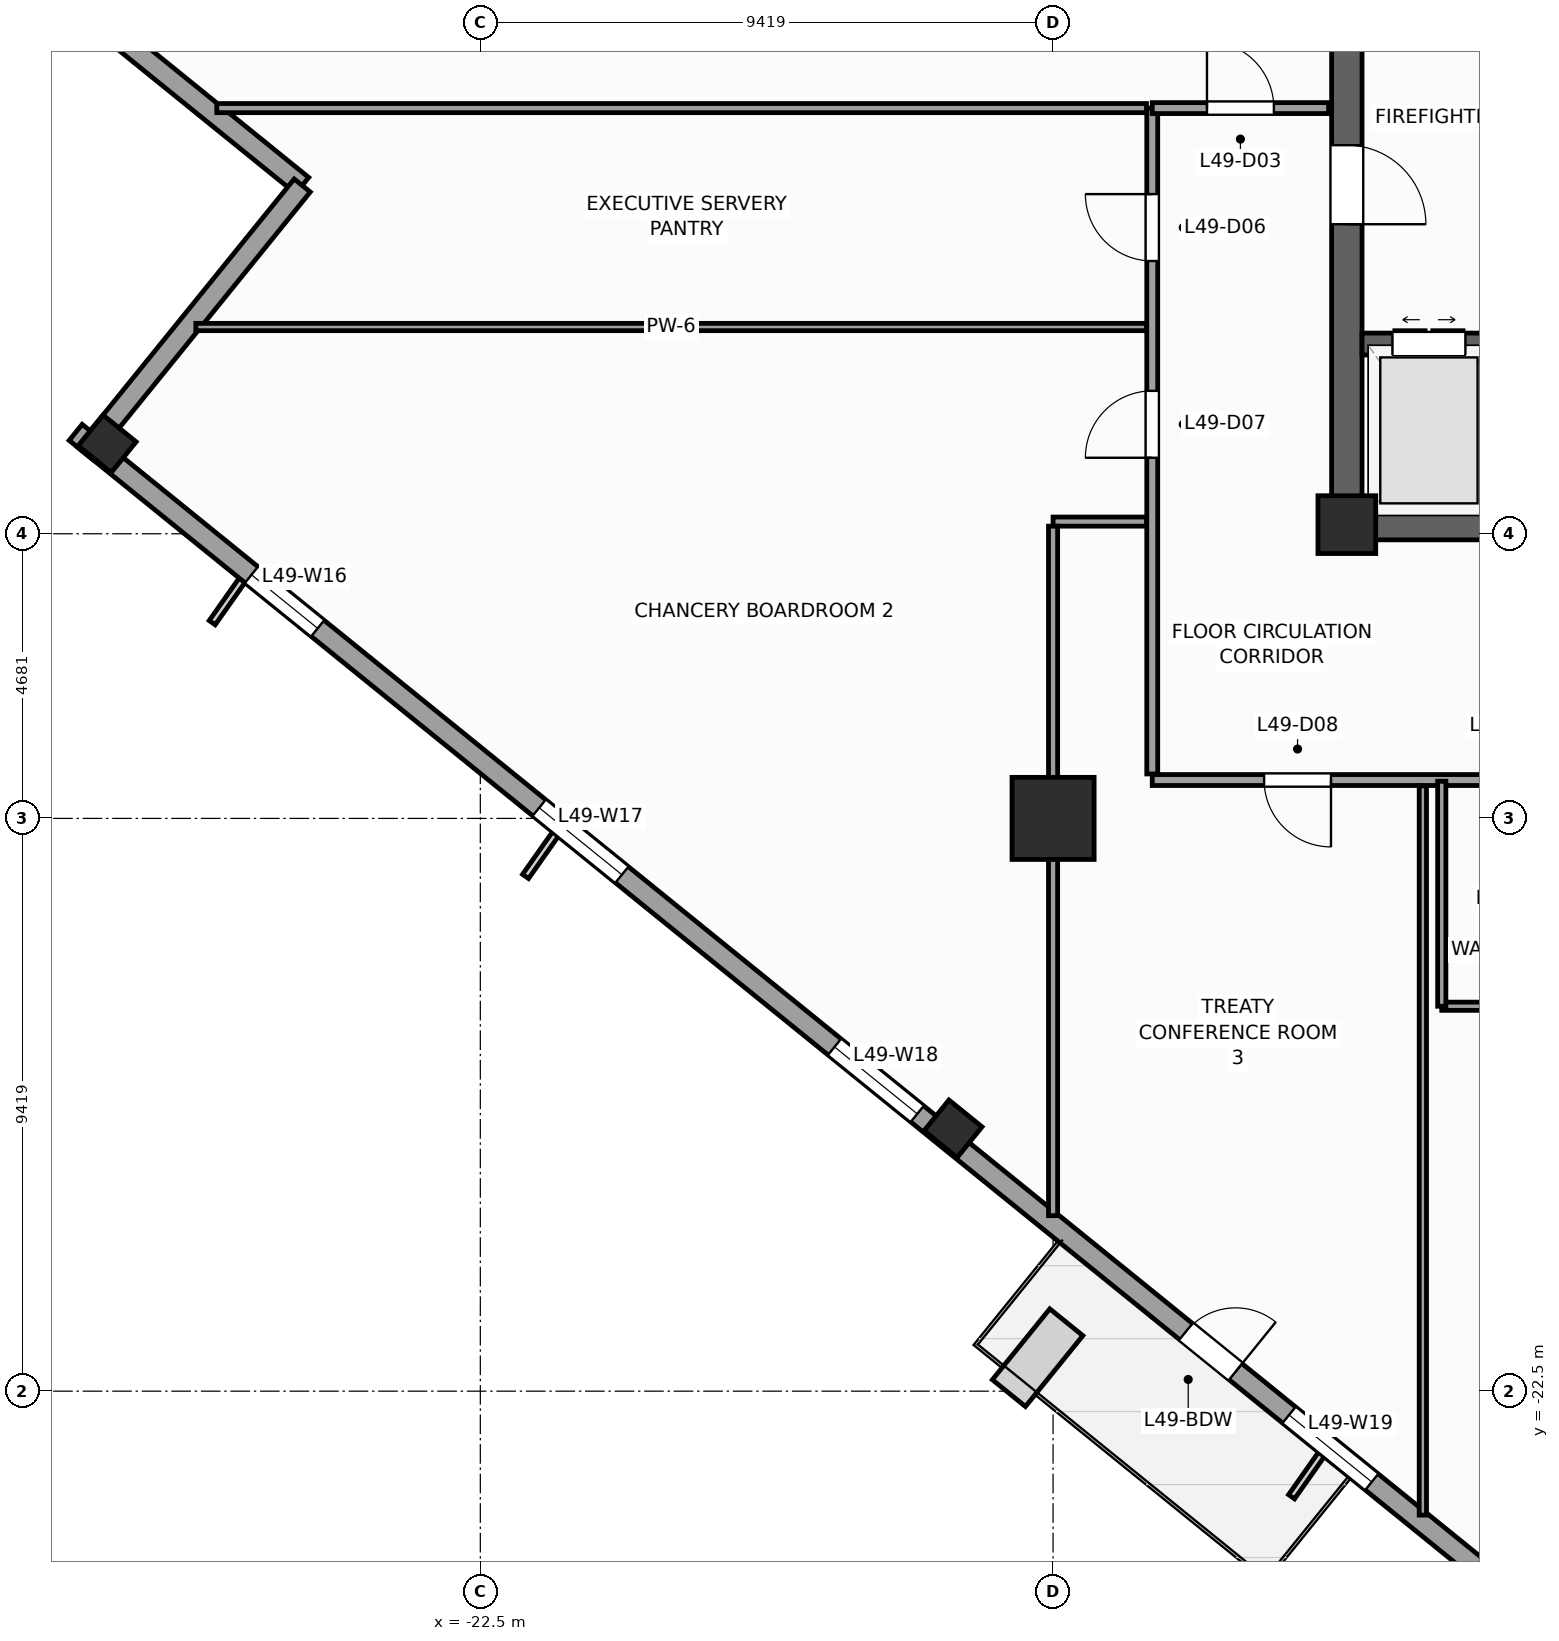
"""IFC4 building model, lengths in metres.
Left out: names, types, materials, properties, quantities, classifications, styles, units other than length and angle.
Written with IfcOpenShell. Run it as: python <this file> out.ifc"""

import sys

from ifc_helpers import new_model, si_unit, direction, frame, frame_2d, origin, origin_2d, place, context, subcontext, project, spatial, rectangle, extrude, source, transform, mapped, element, fill, save


model = new_model("IFC4")
c1 = context("Model", 3, precision=1e-05, world=origin(), true_north=direction((0.0, 1.0)))
c2 = subcontext(c1, "Body", "Model", "MODEL_VIEW")
j1 = project(units=[si_unit("LENGTHUNIT", "METRE"), si_unit("PLANEANGLEUNIT", "RADIAN")], contexts=[c1])
p1 = place(None, origin())
s1 = spatial("IfcSite", under=j1, at=p1, CompositionType="ELEMENT")
p2 = place(p1, origin())
s2 = spatial("IfcBuilding", under=s1, at=p2, CompositionType="ELEMENT")
p3 = place(p2, frame((0.0, 0.0, 205.6)))
s3 = spatial("IfcBuildingStorey", under=s2, at=p3, CompositionType="ELEMENT", Elevation=205.6)
p4 = place(p3, frame((-8.5, -8.25, 0.0), z_axis=(0.0, 0.0, 1.0), x_axis=(1.0, 0.0, 0.0)))
e1 = element("IfcWall", 1, at=p4, inside=s3, PredefinedType="SHEAR", context=c2, shape_type="SweptSolid", body=[
    extrude(rectangle(XDim=17.0, YDim=0.5, at=frame_2d((8.5, 0.0))), origin(), (0.0, 0.0, 1.0), 3.9),
])
p5 = place(p4, frame((7.85, 0.0, 0.0)))
e2 = element("IfcOpeningElement", 2, at=p5, cuts=e1, PredefinedType="OPENING", context=c2, shape_type="SweptSolid", body=[
    extrude(rectangle(XDim=1.3, YDim=2.2, at=frame_2d((0.65, 1.1))), frame((0.0, 0.26, 0.0), z_axis=(0.0, -1.0, 0.0), x_axis=(1.0, 0.0, 0.0)), (0.0, 0.0, 1.0), 0.52),
])
p6 = place(p3, frame((-8.25, -8.0, 0.0), z_axis=(0.0, 0.0, 1.0), x_axis=(0.0, 1.0, 0.0)))
e3 = element("IfcWall", 3, at=p6, inside=s3, PredefinedType="SHEAR", context=c2, shape_type="SweptSolid", body=[
    extrude(rectangle(XDim=16.0, YDim=0.5, at=frame_2d((8.0, 0.0))), origin(), (0.0, 0.0, 1.0), 3.9),
])
p7 = place(p6, frame((4.69, 0.0, 0.0)))
e4 = element("IfcOpeningElement", 4, at=p7, cuts=e3, PredefinedType="OPENING", context=c2, shape_type="SweptSolid", body=[
    extrude(rectangle(XDim=1.3, YDim=2.2, at=frame_2d((0.65, 1.1))), frame((0.0, 0.26, 0.0), z_axis=(0.0, -1.0, 0.0), x_axis=(1.0, 0.0, 0.0)), (0.0, 0.0, 1.0), 0.52),
])
p8 = place(p3, frame((-8.0, -5.28, 0.0), z_axis=(0.0, 0.0, 1.0), x_axis=(1.0, 0.0, 0.0)))
e5 = element("IfcWall", 5, at=p8, inside=s3, PredefinedType="SHEAR", context=c2, shape_type="SweptSolid", body=[
    extrude(rectangle(XDim=3.46, YDim=0.36, at=frame_2d((1.73, 0.0))), origin(), (0.0, 0.0, 1.0), 3.9),
])
p9 = place(p8, frame((0.5, 0.0, 0.0)))
e6 = element("IfcOpeningElement", 6, at=p9, cuts=e5, PredefinedType="OPENING", context=c2, shape_type="SweptSolid", body=[
    extrude(rectangle(XDim=1.2, YDim=2.25, at=frame_2d((0.6, 1.125))), frame((0.0, 0.19, 0.0), z_axis=(0.0, -1.0, 0.0), x_axis=(1.0, 0.0, 0.0)), (0.0, 0.0, 1.0), 0.38),
])
m1 = source(origin(), c2, "Body", "SweptSolid", [
    extrude(rectangle(XDim=0.95, YDim=0.95, at=origin_2d()), origin(), (0.0, 0.0, 1.0), 3.9),
])
p10 = place(p3, frame((-8.25, -8.25, 0.0), z_axis=(0.0, 0.0, 1.0), x_axis=(1.0, 0.0, 0.0)))
e7 = element("IfcColumn", 7, at=p10, inside=s3, PredefinedType="PILASTER", context=c2, shape_type="MappedRepresentation", body=[
    mapped(m1, transform((0.0, 0.0, 0.0), scale=1.0)),
])
m2 = source(origin(), c2, "Body", "SweptSolid", [
    extrude(rectangle(XDim=1.35, YDim=1.35, at=origin_2d()), origin(), (0.0, 0.0, 1.0), 3.9),
])
p11 = place(p3, frame((-13.081, -13.081, 0.0), z_axis=(0.0, 0.0, 1.0), x_axis=(1.0, 0.0, 0.0)))
e8 = element("IfcColumn", 8, at=p11, inside=s3, PredefinedType="COLUMN", context=c2, shape_type="MappedRepresentation", body=[
    mapped(m2, transform((0.0, 0.0, 0.0), scale=1.0)),
])
m3 = source(origin(), c2, "Body", "SweptSolid", [
    extrude(rectangle(XDim=0.65, YDim=0.7, at=origin_2d()), origin(), (0.0, 0.0, 1.0), 3.9),
])
for number, where, z_axis, x_axis in (
    (9, (-28.637, -6.92, 0.0), (0.0, 0.0, 1.0), (0.629, 0.777, 0.0)),
    (10, (-14.726, -18.185, 0.0), (0.0, 0.0, 1.0), (0.629, 0.777, 0.0)),
):
    element("IfcColumn", number, at=place(p3, frame(where, z_axis=z_axis, x_axis=x_axis)), inside=s3, PredefinedType="COLUMN", context=c2, shape_type="MappedRepresentation", body=[
        mapped(m3, transform((0.0, 0.0, 0.0), scale=1.0)),
    ])
p12 = place(p3, frame((-29.703, 0.789, 0.0), z_axis=(0.0, 0.0, 1.0), x_axis=(0.77714355312, -0.629323365087, 0.0)))
e11 = element("IfcWall", 11, at=p12, inside=s3, PredefinedType="STANDARD", context=c2, shape_type="SweptSolid", body=[
    extrude(rectangle(XDim=5.5, YDim=0.34, at=frame_2d((2.75, 0.0))), origin(), (0.0, 0.0, 1.0), 3.66),
])
p13 = place(p3, frame((-25.429, -2.673, 0.0), z_axis=(0.0, 0.0, 1.0), x_axis=(-0.629299794138, -0.777162640055, 0.0)))
e12 = element("IfcWall", 12, at=p13, inside=s3, PredefinedType="STANDARD", context=c2, shape_type="SweptSolid", body=[
    extrude(rectangle(XDim=5.67, YDim=0.34, at=frame_2d((2.835, 0.0))), origin(), (0.0, 0.0, 1.0), 3.66),
])
p14 = place(p3, frame((-29.154, -6.733, 0.0), z_axis=(0.0, 0.0, 1.0), x_axis=(0.77714192302, -0.629325378072, 0.0)))
e13 = element("IfcWall", 13, at=p14, inside=s3, PredefinedType="STANDARD", context=c2, shape_type="SweptSolid", body=[
    extrude(rectangle(XDim=36.84, YDim=0.34, at=frame_2d((18.42, 0.0))), origin(), (0.0, 0.0, 1.0), 2.96),
])
p15 = place(p14, frame((23.495, 0.0, 0.0)))
e14 = element("IfcOpeningElement", 14, at=p15, cuts=e13, PredefinedType="OPENING", context=c2, shape_type="SweptSolid", body=[
    extrude(rectangle(XDim=1.05, YDim=2.25, at=frame_2d((0.525, 1.125))), frame((0.0, 0.18, 0.0), z_axis=(0.0, -1.0, 0.0), x_axis=(1.0, 0.0, 0.0)), (0.0, 0.0, 1.0), 0.36),
])
p16 = place(p14, frame((3.721, 0.0, 0.48)))
e15 = element("IfcOpeningElement", 15, at=p16, cuts=e13, PredefinedType="OPENING", context=c2, shape_type="SweptSolid", body=[
    extrude(rectangle(XDim=1.4, YDim=2.4, at=frame_2d((0.7, 1.2))), frame((0.0, 0.18, 0.0), z_axis=(0.0, -1.0, 0.0), x_axis=(1.0, 0.0, 0.0)), (0.0, 0.0, 1.0), 0.36),
])
p17 = place(p14, frame((9.809, 0.0, 0.58)))
e16 = element("IfcOpeningElement", 16, at=p17, cuts=e13, PredefinedType="OPENING", context=c2, shape_type="SweptSolid", body=[
    extrude(rectangle(XDim=1.75, YDim=2.3, at=frame_2d((0.875, 1.15))), frame((0.0, 0.18, 0.0), z_axis=(0.0, -1.0, 0.0), x_axis=(1.0, 0.0, 0.0)), (0.0, 0.0, 1.0), 0.36),
])
p18 = place(p14, frame((16.058, 0.0, 0.58)))
e17 = element("IfcOpeningElement", 17, at=p18, cuts=e13, PredefinedType="OPENING", context=c2, shape_type="SweptSolid", body=[
    extrude(rectangle(XDim=1.75, YDim=2.3, at=frame_2d((0.875, 1.15))), frame((0.0, 0.18, 0.0), z_axis=(0.0, -1.0, 0.0), x_axis=(1.0, 0.0, 0.0)), (0.0, 0.0, 1.0), 0.36),
])
p19 = place(p14, frame((25.676, 0.0, 0.58)))
e18 = element("IfcOpeningElement", 18, at=p19, cuts=e13, PredefinedType="OPENING", context=c2, shape_type="SweptSolid", body=[
    extrude(rectangle(XDim=1.75, YDim=2.3, at=frame_2d((0.875, 1.15))), frame((0.0, 0.18, 0.0), z_axis=(0.0, -1.0, 0.0), x_axis=(1.0, 0.0, 0.0)), (0.0, 0.0, 1.0), 0.36),
])
p20 = place(p14, frame((30.982, 0.0, 0.48)))
e19 = element("IfcOpeningElement", 19, at=p20, cuts=e13, PredefinedType="OPENING", context=c2, shape_type="SweptSolid", body=[
    extrude(rectangle(XDim=1.4, YDim=2.4, at=frame_2d((0.7, 1.2))), frame((0.0, 0.18, 0.0), z_axis=(0.0, -1.0, 0.0), x_axis=(1.0, 0.0, 0.0)), (0.0, 0.0, 1.0), 0.36),
])
p21 = place(p3, frame((-11.45, -12.45, 0.0), z_axis=(0.0, 0.0, 1.0), x_axis=(1.0, 0.0, 0.0)))
e20 = element("IfcWall", 20, at=p21, inside=s3, PredefinedType="PARTITIONING", context=c2, shape_type="SweptSolid", body=[
    extrude(rectangle(XDim=21.75, YDim=0.18, at=frame_2d((10.875, 0.0))), origin(), (0.0, 0.0, 1.0), 3.66),
])
p22 = place(p21, frame((5.411, 0.0, 0.0)))
e21 = element("IfcOpeningElement", 21, at=p22, cuts=e20, PredefinedType="OPENING", context=c2, shape_type="SweptSolid", body=[
    extrude(rectangle(XDim=0.95, YDim=2.1, at=frame_2d((0.475, 1.05))), frame((0.0, 0.1, 0.0), z_axis=(0.0, -1.0, 0.0), x_axis=(1.0, 0.0, 0.0)), (0.0, 0.0, 1.0), 0.2),
])
p23 = place(p21, frame((1.839, 0.0, 0.0)))
e22 = element("IfcOpeningElement", 22, at=p23, cuts=e20, PredefinedType="OPENING", context=c2, shape_type="SweptSolid", body=[
    extrude(rectangle(XDim=1.1, YDim=2.2, at=frame_2d((0.55, 1.1))), frame((0.0, 0.1, 0.0), z_axis=(0.0, -1.0, 0.0), x_axis=(1.0, 0.0, 0.0)), (0.0, 0.0, 1.0), 0.2),
])
p24 = place(p21, frame((7.574, 0.0, 0.0)))
e23 = element("IfcOpeningElement", 23, at=p24, cuts=e20, PredefinedType="OPENING", context=c2, shape_type="SweptSolid", body=[
    extrude(rectangle(XDim=1.1, YDim=2.2, at=frame_2d((0.55, 1.1))), frame((0.0, 0.1, 0.0), z_axis=(0.0, -1.0, 0.0), x_axis=(1.0, 0.0, 0.0)), (0.0, 0.0, 1.0), 0.2),
])
p25 = place(p21, frame((11.05, 0.0, 0.0)))
e24 = element("IfcOpeningElement", 24, at=p25, cuts=e20, PredefinedType="OPENING", context=c2, shape_type="SweptSolid", body=[
    extrude(rectangle(XDim=1.1, YDim=2.2, at=frame_2d((0.55, 1.1))), frame((0.0, 0.1, 0.0), z_axis=(0.0, -1.0, 0.0), x_axis=(1.0, 0.0, 0.0)), (0.0, 0.0, 1.0), 0.2),
])
p26 = place(p21, frame((15.65, 0.0, 0.0)))
e25 = element("IfcOpeningElement", 25, at=p26, cuts=e20, PredefinedType="OPENING", context=c2, shape_type="SweptSolid", body=[
    extrude(rectangle(XDim=1.1, YDim=2.2, at=frame_2d((0.55, 1.1))), frame((0.0, 0.1, 0.0), z_axis=(0.0, -1.0, 0.0), x_axis=(1.0, 0.0, 0.0)), (0.0, 0.0, 1.0), 0.2),
])
p27 = place(p3, frame((-11.45, -12.35, 0.0), z_axis=(0.0, 0.0, 1.0), x_axis=(0.0, 1.0, 0.0)))
e26 = element("IfcWall", 26, at=p27, inside=s3, PredefinedType="PARTITIONING", context=c2, shape_type="SweptSolid", body=[
    extrude(rectangle(XDim=10.95, YDim=0.18, at=frame_2d((5.475, 0.0))), origin(), (0.0, 0.0, 1.0), 3.66),
])
p28 = place(p27, frame((8.436, 0.0, 0.0)))
e27 = element("IfcOpeningElement", 27, at=p28, cuts=e26, PredefinedType="OPENING", context=c2, shape_type="SweptSolid", body=[
    extrude(rectangle(XDim=1.1, YDim=2.2, at=frame_2d((0.55, 1.1))), frame((0.0, 0.1, 0.0), z_axis=(0.0, -1.0, 0.0), x_axis=(1.0, 0.0, 0.0)), (0.0, 0.0, 1.0), 0.2),
])
p29 = place(p27, frame((5.2, 0.0, 0.0)))
e28 = element("IfcOpeningElement", 28, at=p29, cuts=e26, PredefinedType="OPENING", context=c2, shape_type="SweptSolid", body=[
    extrude(rectangle(XDim=1.1, YDim=2.2, at=frame_2d((0.55, 1.1))), frame((0.0, 0.1, 0.0), z_axis=(0.0, -1.0, 0.0), x_axis=(1.0, 0.0, 0.0)), (0.0, 0.0, 1.0), 0.2),
])
p30 = place(p3, frame((-11.45, -1.4, 0.0), z_axis=(0.0, 0.0, 1.0), x_axis=(1.0, 0.0, 0.0)))
e29 = element("IfcWall", 29, at=p30, inside=s3, PredefinedType="PARTITIONING", context=c2, shape_type="SweptSolid", body=[
    extrude(rectangle(XDim=2.9, YDim=0.18, at=frame_2d((1.45, 0.0))), origin(), (0.0, 0.0, 1.0), 3.66),
])
p31 = place(p30, frame((0.9, 0.0, 0.0)))
e30 = element("IfcOpeningElement", 30, at=p31, cuts=e29, PredefinedType="OPENING", context=c2, shape_type="SweptSolid", body=[
    extrude(rectangle(XDim=1.1, YDim=2.2, at=frame_2d((0.55, 1.1))), frame((0.0, 0.1, 0.0), z_axis=(0.0, -1.0, 0.0), x_axis=(1.0, 0.0, 0.0)), (0.0, 0.0, 1.0), 0.2),
])
p32 = place(p3, frame((-26.834, -1.4, 0.0), z_axis=(0.0, 0.0, 1.0), x_axis=(1.0, 0.0, 0.0)))
e31 = element("IfcWall", 31, at=p32, inside=s3, PredefinedType="PARTITIONING", context=c2, shape_type="SweptSolid", body=[
    extrude(rectangle(XDim=15.289, YDim=0.15, at=frame_2d((7.645, 0.0))), origin(), (0.0, 0.0, 1.0), 3.66),
])
p33 = place(p3, frame((-11.545, -8.2, 0.0), z_axis=(0.0, 0.0, 1.0), x_axis=(-1.0, 0.0, 0.0)))
e32 = element("IfcWall", 32, at=p33, inside=s3, PredefinedType="PARTITIONING", context=c2, shape_type="SweptSolid", body=[
    extrude(rectangle(XDim=1.536, YDim=0.15, at=frame_2d((0.768, 0.0))), origin(), (0.0, 0.0, 1.0), 3.66),
])
p34 = place(p3, frame((-13.081, -8.275, 0.0), z_axis=(0.0, 0.0, 1.0), x_axis=(0.0, -1.0, 0.0)))
e33 = element("IfcWall", 33, at=p34, inside=s3, PredefinedType="PARTITIONING", context=c2, shape_type="SweptSolid", body=[
    extrude(rectangle(XDim=11.339, YDim=0.15, at=frame_2d((5.669, 0.0))), origin(), (0.0, 0.0, 1.0), 2.76),
])
p35 = place(p3, frame((-27.178, -5.0, 0.0), z_axis=(0.0, 0.0, 1.0), x_axis=(1.0, 0.0, 0.0)))
e34 = element("IfcWall", 34, at=p35, inside=s3, PredefinedType="PARTITIONING", context=c2, shape_type="SweptSolid", body=[
    extrude(rectangle(XDim=15.634, YDim=0.12, at=frame_2d((7.817, 0.0))), origin(), (0.0, 0.0, 1.0), 3.66),
])
p36 = place(p3, frame((-7.0, -24.538, 0.0), z_axis=(0.0, 0.0, 1.0), x_axis=(0.0, 1.0, 0.0)))
e35 = element("IfcWall", 35, at=p36, inside=s3, PredefinedType="PARTITIONING", context=c2, shape_type="SweptSolid", body=[
    extrude(rectangle(XDim=11.993, YDim=0.12, at=frame_2d((5.997, 0.0))), origin(), (0.0, 0.0, 1.0), 3.66),
])
p37 = place(p3, frame((-6.689, -16.17, 0.0), z_axis=(0.0, 0.0, 1.0), x_axis=(1.0, 0.0, 0.0)))
e36 = element("IfcWall", 36, at=p37, inside=s3, PredefinedType="PARTITIONING", context=c2, shape_type="SweptSolid", body=[
    extrude(rectangle(XDim=2.25, YDim=0.135, at=frame_2d((1.125, 0.0))), origin(), (0.0, 0.0, 1.0), 3.66),
])
p38 = place(p3, frame((-6.689, -16.17, 0.0), z_axis=(0.0, 0.0, 1.0), x_axis=(0.0, 1.0, 0.0)))
e37 = element("IfcWall", 37, at=p38, inside=s3, PredefinedType="PARTITIONING", context=c2, shape_type="SweptSolid", body=[
    extrude(rectangle(XDim=3.7, YDim=0.135, at=frame_2d((1.85, 0.0))), origin(), (0.0, 0.0, 1.0), 3.66),
])
m4 = source(origin(), c2, "Body", "SweptSolid", [
    extrude(rectangle(XDim=1.05, YDim=2.25, at=frame_2d((0.525, 1.125))), frame((0.0, 0.025, 0.0), z_axis=(0.0, -1.0, 0.0), x_axis=(1.0, 0.0, 0.0)), (0.0, 0.0, 1.0), 0.05),
])
p39 = place(p15, origin())
e38 = element("IfcDoor", 38, at=p39, inside=s3, OperationType="SINGLE_SWING_RIGHT", PredefinedType="DOOR", context=c2, shape_type="MappedRepresentation", body=[
    mapped(m4, transform((0.0, 0.0, 0.0), scale=1.0)),
])
fill(e14, e38)
m5 = source(origin(), c2, "Body", "SweptSolid", [
    extrude(rectangle(XDim=1.4, YDim=2.4, at=frame_2d((0.7, 1.2))), frame((0.0, 0.03, 0.0), z_axis=(0.0, -1.0, 0.0), x_axis=(1.0, 0.0, 0.0)), (0.0, 0.0, 1.0), 0.06),
])
p40 = place(p16, origin())
e39 = element("IfcWindow", 39, at=p40, inside=s3, PartitioningType="SINGLE_PANEL", PredefinedType="WINDOW", context=c2, shape_type="MappedRepresentation", body=[
    mapped(m5, transform((0.0, 0.0, 0.0), scale=1.0)),
])
fill(e15, e39)
m6 = source(origin(), c2, "Body", "SweptSolid", [
    extrude(rectangle(XDim=1.75, YDim=2.3, at=frame_2d((0.875, 1.15))), frame((0.0, 0.03, 0.0), z_axis=(0.0, -1.0, 0.0), x_axis=(1.0, 0.0, 0.0)), (0.0, 0.0, 1.0), 0.06),
])
p41 = place(p17, origin())
e40 = element("IfcWindow", 40, at=p41, inside=s3, PartitioningType="SINGLE_PANEL", PredefinedType="WINDOW", context=c2, shape_type="MappedRepresentation", body=[
    mapped(m6, transform((0.0, 0.0, 0.0), scale=1.0)),
])
fill(e16, e40)
p42 = place(p18, origin())
e41 = element("IfcWindow", 41, at=p42, inside=s3, PartitioningType="SINGLE_PANEL", PredefinedType="WINDOW", context=c2, shape_type="MappedRepresentation", body=[
    mapped(m6, transform((0.0, 0.0, 0.0), scale=1.0)),
])
fill(e17, e41)
p43 = place(p19, origin())
e42 = element("IfcWindow", 42, at=p43, inside=s3, PartitioningType="SINGLE_PANEL", PredefinedType="WINDOW", context=c2, shape_type="MappedRepresentation", body=[
    mapped(m6, transform((0.0, 0.0, 0.0), scale=1.0)),
])
fill(e18, e42)
m7 = source(origin(), c2, "Body", "SweptSolid", [
    extrude(rectangle(XDim=1.3, YDim=2.2, at=frame_2d((0.65, 1.1))), frame((0.0, 0.025, 0.0), z_axis=(0.0, -1.0, 0.0), x_axis=(1.0, 0.0, 0.0)), (0.0, 0.0, 1.0), 0.05),
])
p44 = place(p7, frame((1.3, 0.0, 0.0), z_axis=(0.0, 0.0, 1.0), x_axis=(-1.0, 0.0, 0.0)))
e43 = element("IfcDoor", 43, at=p44, inside=s3, OperationType="SINGLE_SWING_LEFT", PredefinedType="DOOR", context=c2, shape_type="MappedRepresentation", body=[
    mapped(m7, transform((0.0, 0.0, 0.0), scale=1.0)),
])
fill(e4, e43)
m8 = source(origin(), c2, "Body", "SweptSolid", [
    extrude(rectangle(XDim=1.2, YDim=2.25, at=frame_2d((0.6, 1.125))), frame((0.0, 0.025, 0.0), z_axis=(0.0, -1.0, 0.0), x_axis=(1.0, 0.0, 0.0)), (0.0, 0.0, 1.0), 0.05),
])
p45 = place(p9, origin())
e44 = element("IfcDoor", 44, at=p45, inside=s3, OperationType="DOUBLE_DOOR_SLIDING", PredefinedType="DOOR", context=c2, shape_type="MappedRepresentation", body=[
    mapped(m8, transform((0.0, 0.0, 0.0), scale=1.0)),
])
fill(e6, e44)
m9 = source(origin(), c2, "Body", "SweptSolid", [
    extrude(rectangle(XDim=1.1, YDim=2.2, at=frame_2d((0.55, 1.1))), frame((0.0, 0.025, 0.0), z_axis=(0.0, -1.0, 0.0), x_axis=(1.0, 0.0, 0.0)), (0.0, 0.0, 1.0), 0.05),
])
p46 = place(p31, origin())
e45 = element("IfcDoor", 45, at=p46, inside=s3, OperationType="SINGLE_SWING_LEFT", PredefinedType="DOOR", context=c2, shape_type="MappedRepresentation", body=[
    mapped(m9, transform((0.0, 0.0, 0.0), scale=1.0)),
])
fill(e30, e45)
p47 = place(p28, origin())
e46 = element("IfcDoor", 46, at=p47, inside=s3, OperationType="SINGLE_SWING_RIGHT", PredefinedType="DOOR", context=c2, shape_type="MappedRepresentation", body=[
    mapped(m9, transform((0.0, 0.0, 0.0), scale=1.0)),
])
fill(e27, e46)
p48 = place(p29, origin())
e47 = element("IfcDoor", 47, at=p48, inside=s3, OperationType="SINGLE_SWING_LEFT", PredefinedType="DOOR", context=c2, shape_type="MappedRepresentation", body=[
    mapped(m9, transform((0.0, 0.0, 0.0), scale=1.0)),
])
fill(e28, e47)
p49 = place(p23, frame((1.1, 0.0, 0.0), z_axis=(0.0, 0.0, 1.0), x_axis=(-1.0, 0.0, 0.0)))
e48 = element("IfcDoor", 48, at=p49, inside=s3, OperationType="SINGLE_SWING_RIGHT", PredefinedType="DOOR", context=c2, shape_type="MappedRepresentation", body=[
    mapped(m9, transform((0.0, 0.0, 0.0), scale=1.0)),
])
fill(e22, e48)
save(model, sys.argv[1])
